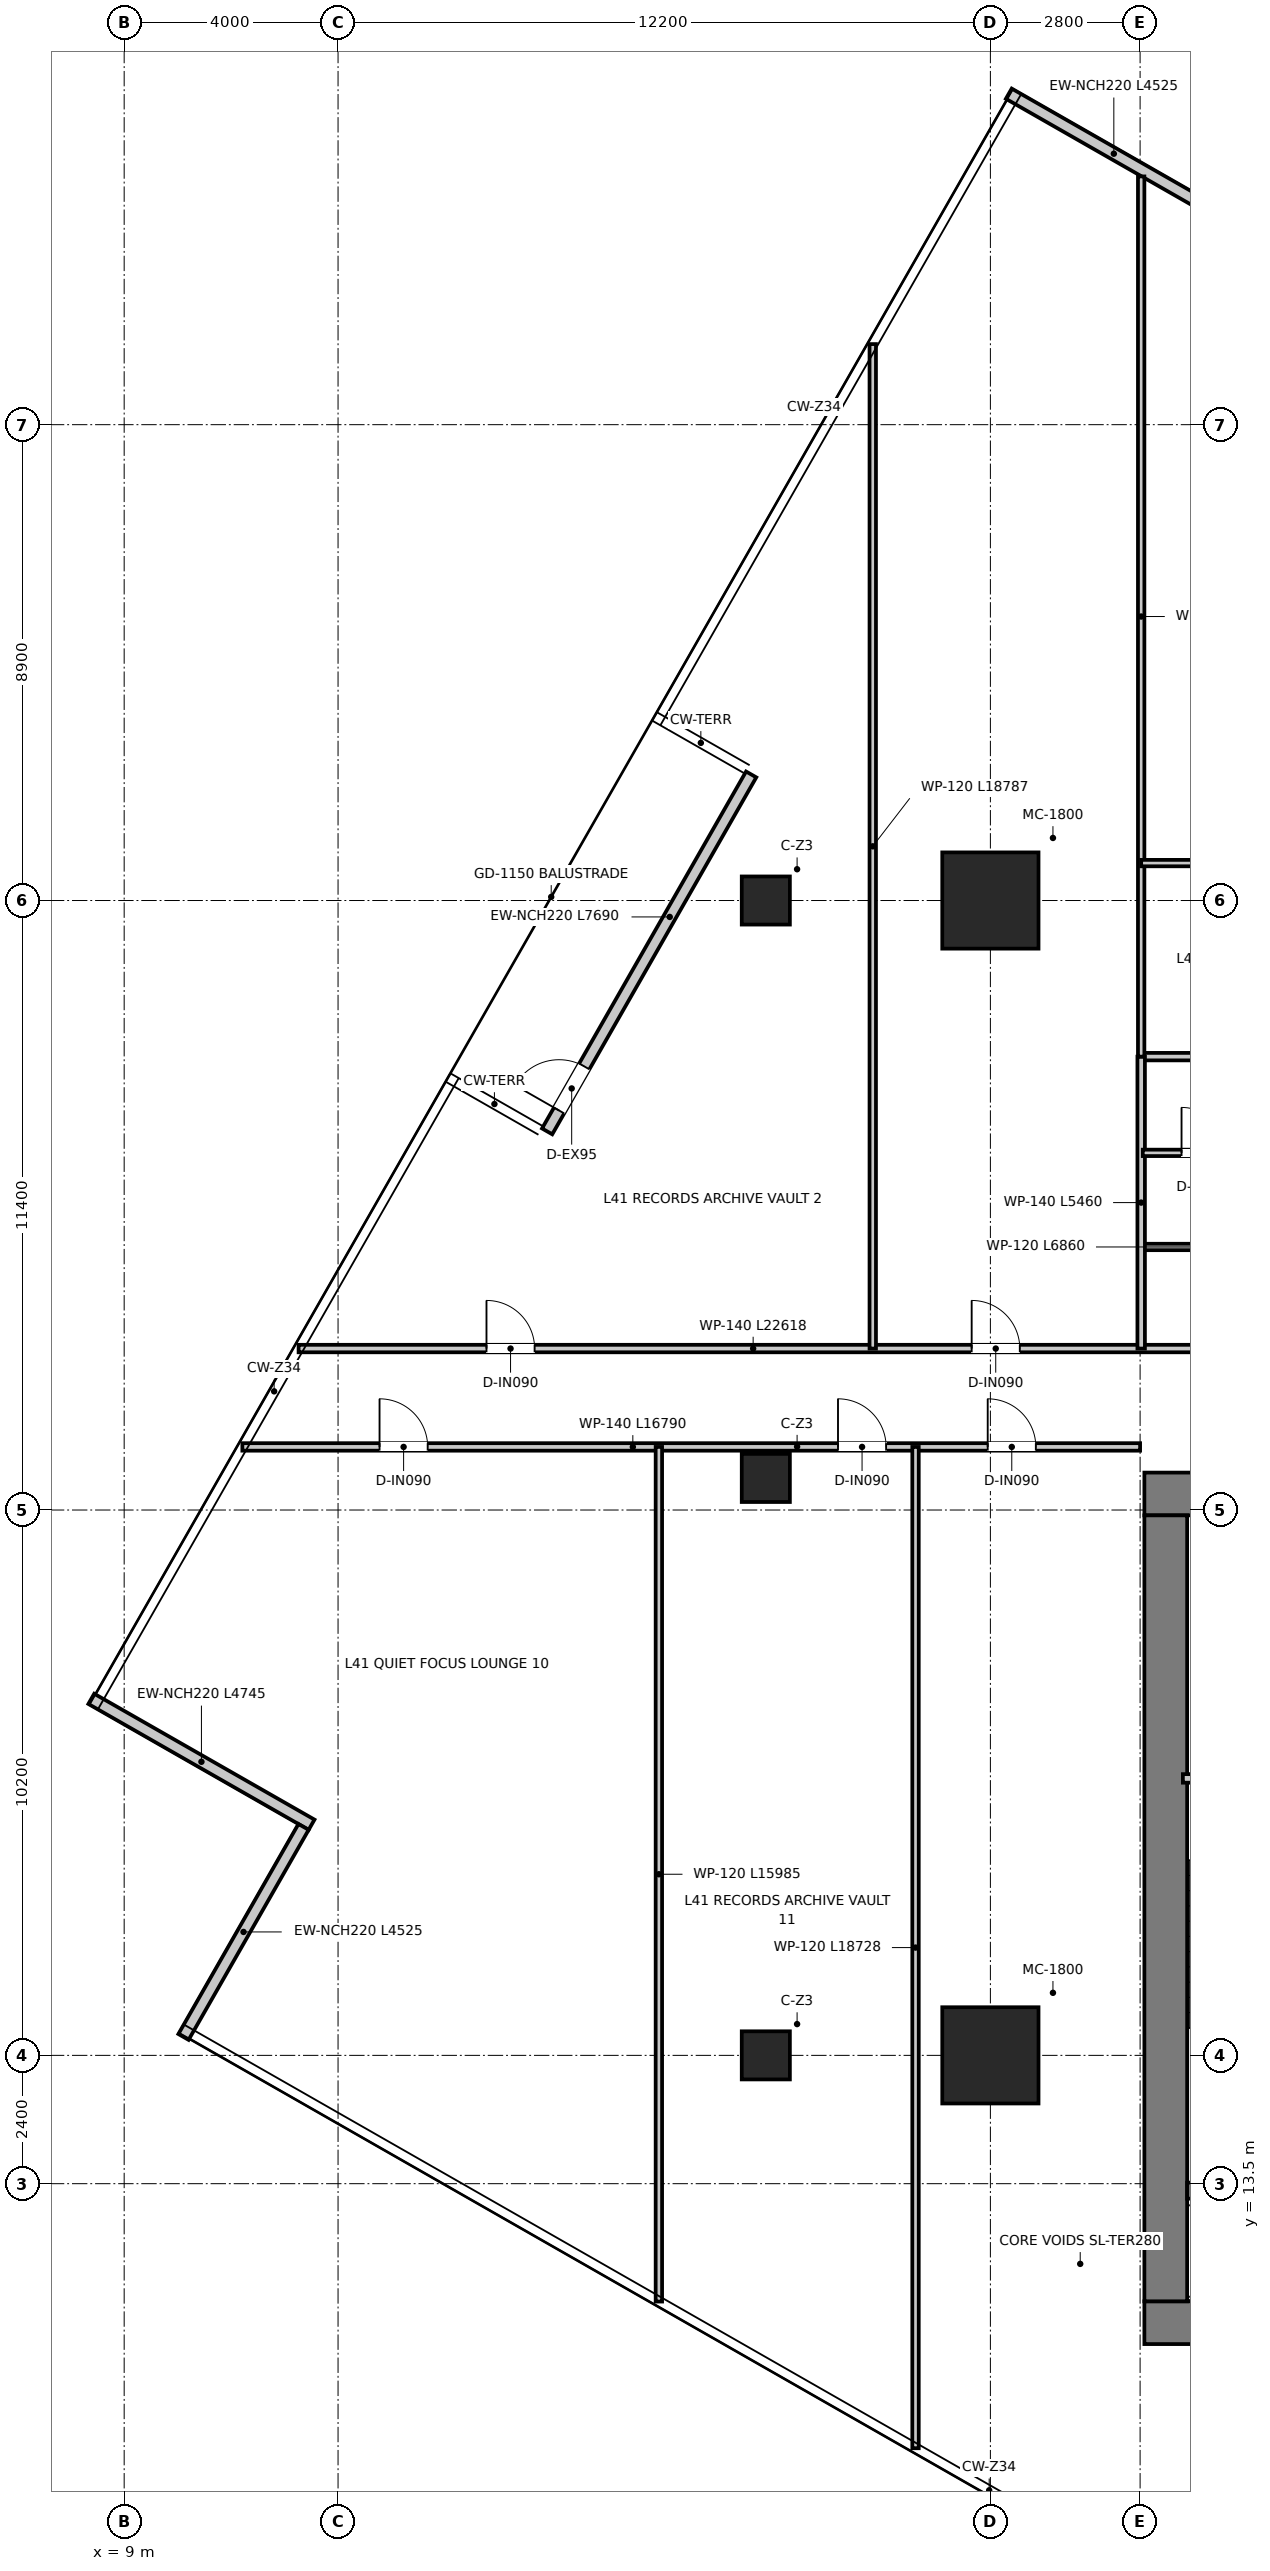
"""IFC4 building model, lengths in metres.
Left out: names, types, materials, properties, quantities, classifications, styles, units other than length and angle.
Written with IfcOpenShell. Run it as: python <this file> out.ifc"""

import sys

from ifc_helpers import new_model, si_unit, direction, frame, frame_2d, origin, origin_2d, place, context, subcontext, project, spatial, rectangle, extrude, source, transform, mapped, element, fill, save


model = new_model("IFC4")
c1 = context("Model", 3, precision=1e-05, world=origin(), true_north=direction((0.0, 1.0)))
c2 = subcontext(c1, "Body", "Model", "MODEL_VIEW")
j1 = project(units=[si_unit("LENGTHUNIT", "METRE"), si_unit("PLANEANGLEUNIT", "RADIAN")], contexts=[c1])
p1 = place(None, origin())
s1 = spatial("IfcSite", under=j1, at=p1, CompositionType="ELEMENT")
p2 = place(p1, origin())
s2 = spatial("IfcBuilding", under=s1, at=p2, CompositionType="ELEMENT")
p3 = place(p2, frame((0.0, 0.0, 169.9)))
s3 = spatial("IfcBuildingStorey", under=s2, at=p3, CompositionType="ELEMENT", Elevation=169.9)
p4 = place(p3, frame((28.08, 10.9, 0.0), z_axis=(0.0, 0.0, 1.0), x_axis=(1.0, 0.0, 0.0)))
e1 = element("IfcWall", 1, at=p4, inside=s3, PredefinedType="SHEAR", context=c2, shape_type="SweptSolid", body=[
    extrude(rectangle(XDim=15.84, YDim=0.8, at=frame_2d((7.92, 0.0))), origin(), (0.0, 0.0, 1.0), 3.95),
])
p5 = place(p3, frame((28.08, 26.4, 0.0), z_axis=(0.0, 0.0, 1.0), x_axis=(1.0, 0.0, 0.0)))
e2 = element("IfcWall", 2, at=p5, inside=s3, PredefinedType="SHEAR", context=c2, shape_type="SweptSolid", body=[
    extrude(rectangle(XDim=15.84, YDim=0.8, at=frame_2d((7.92, 0.0))), origin(), (0.0, 0.0, 1.0), 3.95),
])
p6 = place(p5, frame((7.22, 0.0, 0.0)))
e3 = element("IfcOpeningElement", 3, at=p6, cuts=e2, PredefinedType="OPENING", context=c2, shape_type="SweptSolid", body=[
    extrude(rectangle(XDim=1.4, YDim=2.2, at=frame_2d((0.7, 1.1))), frame((0.0, 0.41, 0.0), z_axis=(0.0, -1.0, 0.0), x_axis=(1.0, 0.0, 0.0)), (0.0, 0.0, 1.0), 0.82),
])
p7 = place(p5, frame((1.775, 0.0, 0.0)))
e4 = element("IfcOpeningElement", 4, at=p7, cuts=e2, PredefinedType="OPENING", context=c2, shape_type="SweptSolid", body=[
    extrude(rectangle(XDim=1.05, YDim=2.1, at=frame_2d((0.525, 1.05))), frame((0.0, 0.41, 0.0), z_axis=(0.0, -1.0, 0.0), x_axis=(1.0, 0.0, 0.0)), (0.0, 0.0, 1.0), 0.82),
])
p8 = place(p5, frame((13.015, 0.0, 0.0)))
e5 = element("IfcOpeningElement", 5, at=p8, cuts=e2, PredefinedType="OPENING", context=c2, shape_type="SweptSolid", body=[
    extrude(rectangle(XDim=1.05, YDim=2.1, at=frame_2d((0.525, 1.05))), frame((0.0, 0.41, 0.0), z_axis=(0.0, -1.0, 0.0), x_axis=(1.0, 0.0, 0.0)), (0.0, 0.0, 1.0), 0.82),
])
p9 = place(p3, frame((28.48, 11.3, 0.0), z_axis=(0.0, 0.0, 1.0), x_axis=(0.0, 1.0, 0.0)))
e6 = element("IfcWall", 6, at=p9, inside=s3, PredefinedType="SHEAR", context=c2, shape_type="SweptSolid", body=[
    extrude(rectangle(XDim=14.7, YDim=0.8, at=frame_2d((7.35, 0.0))), origin(), (0.0, 0.0, 1.0), 3.95),
])
p10 = place(p3, frame((28.88, 13.37, 0.0), z_axis=(0.0, 0.0, 1.0), x_axis=(1.0, 0.0, 0.0)))
e7 = element("IfcWall", 7, at=p10, inside=s3, PredefinedType="SHEAR", context=c2, shape_type="SweptSolid", body=[
    extrude(rectangle(XDim=3.1, YDim=0.3, at=frame_2d((1.55, 0.0))), origin(), (0.0, 0.0, 1.0), 3.95),
])
m1 = source(origin(), c2, "Body", "SweptSolid", [
    extrude(rectangle(XDim=1.8, YDim=1.8, at=origin_2d()), origin(), (0.0, 0.0, 1.0), 3.95),
])
for number, where, z_axis, x_axis in (
    (8, (25.2, 15.9, 0.0), (0.0, 0.0, 1.0), (1.0, 0.0, 0.0)),
    (9, (25.2, 37.5, 0.0), (0.0, 0.0, 1.0), (1.0, 0.0, 0.0)),
):
    element("IfcColumn", number, at=place(p3, frame(where, z_axis=z_axis, x_axis=x_axis)), inside=s3, PredefinedType="USERDEFINED", context=c2, shape_type="MappedRepresentation", body=[
        mapped(m1, transform((0.0, 0.0, 0.0), x_axis=(1.0, 0.0, 0.0), y_axis=(0.0, 1.0, 0.0), z_axis=(0.0, 0.0, 1.0), scale=1.0)),
    ])
m2 = source(origin(), c2, "Body", "SweptSolid", [
    extrude(rectangle(XDim=0.9, YDim=0.9, at=origin_2d()), origin(), (0.0, 0.0, 1.0), 3.95),
])
for number, where, z_axis, x_axis in (
    (10, (21.0, 15.9, 0.0), (0.0, 0.0, 1.0), (1.0, 0.0, 0.0)),
    (11, (21.0, 26.7, 0.0), (0.0, 0.0, 1.0), (1.0, 0.0, 0.0)),
    (12, (21.0, 37.5, 0.0), (0.0, 0.0, 1.0), (1.0, 0.0, 0.0)),
):
    element("IfcColumn", number, at=place(p3, frame(where, z_axis=z_axis, x_axis=x_axis)), inside=s3, PredefinedType="COLUMN", context=c2, shape_type="MappedRepresentation", body=[
        mapped(m2, transform((0.0, 0.0, 0.0), x_axis=(1.0, 0.0, 0.0), y_axis=(0.0, 1.0, 0.0), z_axis=(0.0, 0.0, 1.0), scale=1.0)),
    ])
p11 = place(p3, frame((29.473, 50.345, 0.0), z_axis=(0.0, 0.0, 1.0), x_axis=(-0.868170087613, 0.496266761908, 0.0)))
e13 = element("IfcWall", 13, at=p11, inside=s3, PredefinedType="ELEMENTEDWALL", context=c2, shape_type="SweptSolid", body=[
    extrude(rectangle(XDim=4.525, YDim=0.22, at=frame_2d((2.262, 0.0))), origin(), (0.0, 0.0, 1.0), 3.67),
])
p12 = place(p3, frame((16.91, 33.182, 0.0), z_axis=(0.0, 0.0, 1.0), x_axis=(0.496214153759, 0.868200157572, 0.0)))
e14 = element("IfcWall", 14, at=p12, inside=s3, PredefinedType="ELEMENTEDWALL", context=c2, shape_type="SweptSolid", body=[
    extrude(rectangle(XDim=7.69, YDim=0.22, at=frame_2d((3.845, 0.0))), origin(), (0.0, 0.0, 1.0), 3.67),
])
p13 = place(p12, frame((0.45, 0.0, 0.0)))
e15 = element("IfcOpeningElement", 15, at=p13, cuts=e14, PredefinedType="OPENING", context=c2, shape_type="SweptSolid", body=[
    extrude(rectangle(XDim=0.95, YDim=2.1, at=frame_2d((0.475, 1.05))), frame((0.0, 0.12, 0.0), z_axis=(0.0, -1.0, 0.0), x_axis=(1.0, 0.0, 0.0)), (0.0, 0.0, 1.0), 0.24),
])
p14 = place(p3, frame((8.385, 22.568, 0.0), z_axis=(0.0, 0.0, 1.0), x_axis=(0.868192474665, -0.496227595903, 0.0)))
e16 = element("IfcWall", 16, at=p14, inside=s3, PredefinedType="ELEMENTEDWALL", context=c2, shape_type="SweptSolid", body=[
    extrude(rectangle(XDim=4.745, YDim=0.22, at=frame_2d((2.373, 0.0))), origin(), (0.0, 0.0, 1.0), 3.67),
])
p15 = place(p3, frame((12.355, 20.173, 0.0), z_axis=(0.0, 0.0, 1.0), x_axis=(-0.496226094278, -0.868193332938, 0.0)))
e17 = element("IfcWall", 17, at=p15, inside=s3, PredefinedType="ELEMENTEDWALL", context=c2, shape_type="SweptSolid", body=[
    extrude(rectangle(XDim=4.525, YDim=0.22, at=frame_2d((2.262, 0.0))), origin(), (0.0, 0.0, 1.0), 3.67),
])
p16 = place(p3, frame((28.8, 21.08, 0.0), z_axis=(0.0, 0.0, 1.0), x_axis=(1.0, 0.0, 0.0)))
e18 = element("IfcWall", 18, at=p16, inside=s3, PredefinedType="PARTITIONING", context=c2, shape_type="SweptSolid", body=[
    extrude(rectangle(XDim=3.16, YDim=0.16, at=frame_2d((1.58, 0.0))), origin(), (0.0, 0.0, 1.0), 3.67),
])
p17 = place(p16, frame((1.055, 0.0, 0.0)))
e19 = element("IfcOpeningElement", 19, at=p17, cuts=e18, PredefinedType="OPENING", context=c2, shape_type="SweptSolid", body=[
    extrude(rectangle(XDim=1.05, YDim=2.1, at=frame_2d((0.525, 1.05))), frame((0.0, 0.09, 0.0), z_axis=(0.0, -1.0, 0.0), x_axis=(1.0, 0.0, 0.0)), (0.0, 0.0, 1.0), 0.18),
])
p18 = place(p3, frame((12.262, 29.12, 0.0), z_axis=(0.0, 0.0, 1.0), x_axis=(1.0, 0.0, 0.0)))
e20 = element("IfcWall", 20, at=p18, inside=s3, PredefinedType="PARTITIONING", context=c2, shape_type="SweptSolid", body=[
    extrude(rectangle(XDim=22.618, YDim=0.14, at=frame_2d((11.309, 0.0))), origin(), (0.0, 0.0, 1.0), 3.03),
])
p19 = place(p18, frame((18.688, 0.0, 0.0)))
e21 = element("IfcOpeningElement", 21, at=p19, cuts=e20, PredefinedType="OPENING", context=c2, shape_type="SweptSolid", body=[
    extrude(rectangle(XDim=0.9, YDim=2.1, at=frame_2d((0.45, 1.05))), frame((0.0, 0.08, 0.0), z_axis=(0.0, -1.0, 0.0), x_axis=(1.0, 0.0, 0.0)), (0.0, 0.0, 1.0), 0.16),
])
p20 = place(p18, frame((3.514, 0.0, 0.0)))
e22 = element("IfcOpeningElement", 22, at=p20, cuts=e20, PredefinedType="OPENING", context=c2, shape_type="SweptSolid", body=[
    extrude(rectangle(XDim=0.9, YDim=2.1, at=frame_2d((0.45, 1.05))), frame((0.0, 0.08, 0.0), z_axis=(0.0, -1.0, 0.0), x_axis=(1.0, 0.0, 0.0)), (0.0, 0.0, 1.0), 0.16),
])
p21 = place(p18, frame((12.588, 0.0, 0.0)))
e23 = element("IfcOpeningElement", 23, at=p21, cuts=e20, PredefinedType="OPENING", context=c2, shape_type="SweptSolid", body=[
    extrude(rectangle(XDim=0.9, YDim=2.1, at=frame_2d((0.45, 1.05))), frame((0.0, 0.08, 0.0), z_axis=(0.0, -1.0, 0.0), x_axis=(1.0, 0.0, 0.0)), (0.0, 0.0, 1.0), 0.16),
])
p22 = place(p3, frame((11.21, 27.28, 0.0), z_axis=(0.0, 0.0, 1.0), x_axis=(1.0, 0.0, 0.0)))
e24 = element("IfcWall", 24, at=p22, inside=s3, PredefinedType="PARTITIONING", context=c2, shape_type="SweptSolid", body=[
    extrude(rectangle(XDim=16.79, YDim=0.14, at=frame_2d((8.395, 0.0))), origin(), (0.0, 0.0, 1.0), 3.03),
])
p23 = place(p22, frame((2.565, 0.0, 0.0)))
e25 = element("IfcOpeningElement", 25, at=p23, cuts=e24, PredefinedType="OPENING", context=c2, shape_type="SweptSolid", body=[
    extrude(rectangle(XDim=0.9, YDim=2.1, at=frame_2d((0.45, 1.05))), frame((0.0, 0.08, 0.0), z_axis=(0.0, -1.0, 0.0), x_axis=(1.0, 0.0, 0.0)), (0.0, 0.0, 1.0), 0.16),
])
p24 = place(p22, frame((11.139, 0.0, 0.0)))
e26 = element("IfcOpeningElement", 26, at=p24, cuts=e24, PredefinedType="OPENING", context=c2, shape_type="SweptSolid", body=[
    extrude(rectangle(XDim=0.9, YDim=2.1, at=frame_2d((0.45, 1.05))), frame((0.0, 0.08, 0.0), z_axis=(0.0, -1.0, 0.0), x_axis=(1.0, 0.0, 0.0)), (0.0, 0.0, 1.0), 0.16),
])
p25 = place(p22, frame((13.939, 0.0, 0.0)))
e27 = element("IfcOpeningElement", 27, at=p25, cuts=e24, PredefinedType="OPENING", context=c2, shape_type="SweptSolid", body=[
    extrude(rectangle(XDim=0.9, YDim=2.1, at=frame_2d((0.45, 1.05))), frame((0.0, 0.08, 0.0), z_axis=(0.0, -1.0, 0.0), x_axis=(1.0, 0.0, 0.0)), (0.0, 0.0, 1.0), 0.16),
])
p26 = place(p3, frame((28.02, 31.02, 0.0), z_axis=(0.0, 0.0, 1.0), x_axis=(1.0, 0.0, 0.0)))
e28 = element("IfcWall", 28, at=p26, inside=s3, PredefinedType="PARTITIONING", context=c2, shape_type="SweptSolid", body=[
    extrude(rectangle(XDim=6.86, YDim=0.12, at=frame_2d((3.43, 0.0))), origin(), (0.0, 0.0, 1.0), 3.08),
])
p27 = place(p3, frame((28.02, 34.58, 0.0), z_axis=(0.0, 0.0, 1.0), x_axis=(1.0, 0.0, 0.0)))
e29 = element("IfcWall", 29, at=p27, inside=s3, PredefinedType="PARTITIONING", context=c2, shape_type="SweptSolid", body=[
    extrude(rectangle(XDim=6.86, YDim=0.14, at=frame_2d((3.43, 0.0))), origin(), (0.0, 0.0, 1.0), 3.08),
])
p28 = place(p3, frame((28.02, 29.12, 0.0), z_axis=(0.0, 0.0, 1.0), x_axis=(0.0, 1.0, 0.0)))
e30 = element("IfcWall", 30, at=p28, inside=s3, PredefinedType="PARTITIONING", context=c2, shape_type="SweptSolid", body=[
    extrude(rectangle(XDim=5.46, YDim=0.14, at=frame_2d((2.73, 0.0))), origin(), (0.0, 0.0, 1.0), 3.31),
])
p29 = place(p3, frame((28.05, 32.78, 0.0), z_axis=(0.0, 0.0, 1.0), x_axis=(1.0, 0.0, 0.0)))
e31 = element("IfcWall", 31, at=p29, inside=s3, PredefinedType="PARTITIONING", context=c2, shape_type="SweptSolid", body=[
    extrude(rectangle(XDim=6.8, YDim=0.12, at=frame_2d((3.4, 0.0))), origin(), (0.0, 0.0, 1.0), 3.08),
])
p30 = place(p29, frame((0.725, 0.0, 0.0)))
e32 = element("IfcOpeningElement", 32, at=p30, cuts=e31, PredefinedType="OPENING", context=c2, shape_type="SweptSolid", body=[
    extrude(rectangle(XDim=0.85, YDim=2.1, at=frame_2d((0.425, 1.05))), frame((0.0, 0.07, 0.0), z_axis=(0.0, -1.0, 0.0), x_axis=(1.0, 0.0, 0.0)), (0.0, 0.0, 1.0), 0.14),
])
p31 = place(p29, frame((3.065, 0.0, 0.0)))
e33 = element("IfcOpeningElement", 33, at=p31, cuts=e31, PredefinedType="OPENING", context=c2, shape_type="SweptSolid", body=[
    extrude(rectangle(XDim=0.85, YDim=2.1, at=frame_2d((0.425, 1.05))), frame((0.0, 0.07, 0.0), z_axis=(0.0, -1.0, 0.0), x_axis=(1.0, 0.0, 0.0)), (0.0, 0.0, 1.0), 0.14),
])
p32 = place(p29, frame((5.25, 0.0, 0.0)))
e34 = element("IfcOpeningElement", 34, at=p32, cuts=e31, PredefinedType="OPENING", context=c2, shape_type="SweptSolid", body=[
    extrude(rectangle(XDim=0.9, YDim=2.1, at=frame_2d((0.45, 1.05))), frame((0.0, 0.07, 0.0), z_axis=(0.0, -1.0, 0.0), x_axis=(1.0, 0.0, 0.0)), (0.0, 0.0, 1.0), 0.14),
])
p33 = place(p3, frame((23.0, 29.12, 0.0), z_axis=(0.0, 0.0, 1.0), x_axis=(0.0, 1.0, 0.0)))
e35 = element("IfcWall", 35, at=p33, inside=s3, PredefinedType="PARTITIONING", context=c2, shape_type="SweptSolid", body=[
    extrude(rectangle(XDim=18.787, YDim=0.12, at=frame_2d((9.394, 0.0))), origin(), (0.0, 0.0, 1.0), 3.08),
])
p34 = place(p3, frame((28.02, 34.58, 0.0), z_axis=(0.0, 0.0, 1.0), x_axis=(0.0, 1.0, 0.0)))
e36 = element("IfcWall", 36, at=p34, inside=s3, PredefinedType="PARTITIONING", context=c2, shape_type="SweptSolid", body=[
    extrude(rectangle(XDim=16.463, YDim=0.12, at=frame_2d((8.231, 0.0))), origin(), (0.0, 0.0, 1.0), 3.03),
])
p35 = place(p3, frame((28.02, 38.2, 0.0), z_axis=(0.0, 0.0, 1.0), x_axis=(1.0, 0.0, 0.0)))
e37 = element("IfcWall", 37, at=p35, inside=s3, PredefinedType="PARTITIONING", context=c2, shape_type="SweptSolid", body=[
    extrude(rectangle(XDim=6.86, YDim=0.12, at=frame_2d((3.43, 0.0))), origin(), (0.0, 0.0, 1.0), 3.08),
])
p36 = place(p3, frame((19.0, 11.295, 0.0), z_axis=(0.0, 0.0, 1.0), x_axis=(0.0, 1.0, 0.0)))
e38 = element("IfcWall", 38, at=p36, inside=s3, PredefinedType="PARTITIONING", context=c2, shape_type="SweptSolid", body=[
    extrude(rectangle(XDim=15.985, YDim=0.12, at=frame_2d((7.992, 0.0))), origin(), (0.0, 0.0, 1.0), 3.67),
])
p37 = place(p3, frame((23.8, 8.552, 0.0), z_axis=(0.0, 0.0, 1.0), x_axis=(0.0, 1.0, 0.0)))
e39 = element("IfcWall", 39, at=p37, inside=s3, PredefinedType="PARTITIONING", context=c2, shape_type="SweptSolid", body=[
    extrude(rectangle(XDim=18.728, YDim=0.12, at=frame_2d((9.364, 0.0))), origin(), (0.0, 0.0, 1.0), 3.08),
])
p38 = place(p30, origin())
e40 = element("IfcDoor", 40, at=p38, inside=s3, OperationType="SINGLE_SWING_LEFT", PredefinedType="DOOR", context=c2, shape_type="SweptSolid", body=[
    extrude(rectangle(XDim=0.85, YDim=2.1, at=frame_2d((0.425, 1.05))), frame((0.0, 0.025, 0.0), z_axis=(0.0, -1.0, 0.0), x_axis=(1.0, 0.0, 0.0)), (0.0, 0.0, 1.0), 0.05),
])
fill(e32, e40)
p39 = place(p20, origin())
e41 = element("IfcDoor", 41, at=p39, inside=s3, OperationType="SINGLE_SWING_LEFT", PredefinedType="DOOR", context=c2, shape_type="SweptSolid", body=[
    extrude(rectangle(XDim=0.9, YDim=2.1, at=frame_2d((0.45, 1.05))), frame((0.0, 0.025, 0.0), z_axis=(0.0, -1.0, 0.0), x_axis=(1.0, 0.0, 0.0)), (0.0, 0.0, 1.0), 0.05),
])
fill(e22, e41)
p40 = place(p21, origin())
e42 = element("IfcDoor", 42, at=p40, inside=s3, OperationType="SINGLE_SWING_LEFT", PredefinedType="DOOR", context=c2, shape_type="SweptSolid", body=[
    extrude(rectangle(XDim=0.9, YDim=2.1, at=frame_2d((0.45, 1.05))), frame((0.0, 0.025, 0.0), z_axis=(0.0, -1.0, 0.0), x_axis=(1.0, 0.0, 0.0)), (0.0, 0.0, 1.0), 0.05),
])
fill(e23, e42)
p41 = place(p23, origin())
e43 = element("IfcDoor", 43, at=p41, inside=s3, OperationType="SINGLE_SWING_LEFT", PredefinedType="DOOR", context=c2, shape_type="SweptSolid", body=[
    extrude(rectangle(XDim=0.9, YDim=2.1, at=frame_2d((0.45, 1.05))), frame((0.0, 0.025, 0.0), z_axis=(0.0, -1.0, 0.0), x_axis=(1.0, 0.0, 0.0)), (0.0, 0.0, 1.0), 0.05),
])
fill(e25, e43)
p42 = place(p24, origin())
e44 = element("IfcDoor", 44, at=p42, inside=s3, OperationType="SINGLE_SWING_LEFT", PredefinedType="DOOR", context=c2, shape_type="SweptSolid", body=[
    extrude(rectangle(XDim=0.9, YDim=2.1, at=frame_2d((0.45, 1.05))), frame((0.0, 0.025, 0.0), z_axis=(0.0, -1.0, 0.0), x_axis=(1.0, 0.0, 0.0)), (0.0, 0.0, 1.0), 0.05),
])
fill(e26, e44)
p43 = place(p25, origin())
e45 = element("IfcDoor", 45, at=p43, inside=s3, OperationType="SINGLE_SWING_LEFT", PredefinedType="DOOR", context=c2, shape_type="SweptSolid", body=[
    extrude(rectangle(XDim=0.9, YDim=2.1, at=frame_2d((0.45, 1.05))), frame((0.0, 0.025, 0.0), z_axis=(0.0, -1.0, 0.0), x_axis=(1.0, 0.0, 0.0)), (0.0, 0.0, 1.0), 0.05),
])
fill(e27, e45)
p44 = place(p13, origin())
e46 = element("IfcDoor", 46, at=p44, inside=s3, OperationType="SINGLE_SWING_LEFT", PredefinedType="DOOR", context=c2, shape_type="SweptSolid", body=[
    extrude(rectangle(XDim=0.95, YDim=2.1, at=frame_2d((0.475, 1.05))), frame((0.0, 0.025, 0.0), z_axis=(0.0, -1.0, 0.0), x_axis=(1.0, 0.0, 0.0)), (0.0, 0.0, 1.0), 0.05),
])
fill(e15, e46)
save(model, sys.argv[1])
